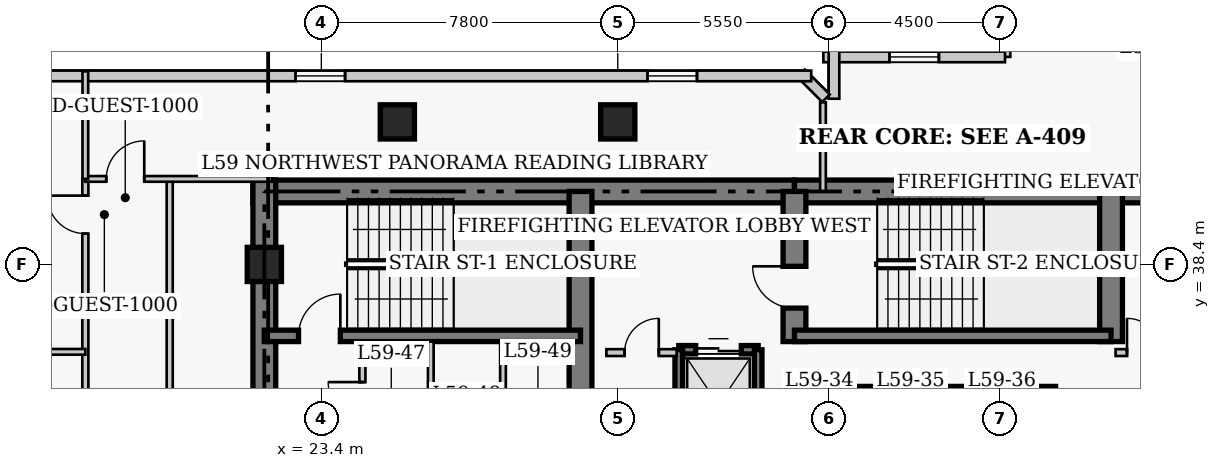
"""IFC4 building model, lengths in metres.
Left out: names, types, materials, properties, quantities, classifications, styles, units other than length and angle.
Written with IfcOpenShell. Run it as: python <this file> out.ifc"""

import sys

from ifc_helpers import new_model, si_unit, direction, frame, frame_2d, origin, origin_2d, place, context, subcontext, project, spatial, rectangle, extrude, element, fill, save


model = new_model("IFC4")
c1 = context("Model", 3, precision=1e-05, world=origin(), true_north=direction((0.0, 1.0)))
c2 = subcontext(c1, "Body", "Model", "MODEL_VIEW")
j1 = project(units=[si_unit("LENGTHUNIT", "METRE"), si_unit("PLANEANGLEUNIT", "RADIAN")], contexts=[c1])
p1 = place(None, origin())
s1 = spatial("IfcSite", under=j1, at=p1, CompositionType="ELEMENT")
p2 = place(p1, origin())
s2 = spatial("IfcBuilding", under=s1, at=p2, CompositionType="ELEMENT")
p3 = place(p2, frame((0.0, 0.0, 236.5)))
s3 = spatial("IfcBuildingStorey", under=s2, at=p3, CompositionType="ELEMENT", Elevation=236.5)
p4 = place(p3, frame((21.6, 40.32, 0.0), z_axis=(0.0, 0.0, 1.0), x_axis=(1.0, 0.0, 0.0)))
e1 = element("IfcWall", 1, at=p4, inside=s3, PredefinedType="SHEAR", context=c2, shape_type="SweptSolid", body=[
    extrude(rectangle(XDim=14.25, YDim=0.6, at=frame_2d((7.125, 0.0))), origin(), (0.0, 0.0, 1.0), 3.9),
])
p5 = place(p3, frame((35.85, 40.32, 0.0), z_axis=(0.0, 0.0, 1.0), x_axis=(1.0, 0.0, 0.0)))
e2 = element("IfcWall", 2, at=p5, inside=s3, PredefinedType="SHEAR", context=c2, shape_type="SweptSolid", body=[
    extrude(rectangle(XDim=12.6, YDim=0.6, at=frame_2d((6.3, 0.0))), origin(), (0.0, 0.0, 1.0), 3.9),
])
p6 = place(p3, frame((21.9, 27.05, 0.0), z_axis=(0.0, 0.0, 1.0), x_axis=(0.0, 1.0, 0.0)))
e3 = element("IfcWall", 3, at=p6, inside=s3, PredefinedType="SHEAR", context=c2, shape_type="SweptSolid", body=[
    extrude(rectangle(XDim=13.57, YDim=0.6, at=frame_2d((6.785, 0.0))), origin(), (0.0, 0.0, 1.0), 3.9),
])
p7 = place(p3, frame((30.22, 33.05, 0.0), z_axis=(0.0, 0.0, 1.0), x_axis=(0.0, 1.0, 0.0)))
e4 = element("IfcWall", 4, at=p7, inside=s3, PredefinedType="SHEAR", context=c2, shape_type="SweptSolid", body=[
    extrude(rectangle(XDim=7.27, YDim=0.6, at=frame_2d((3.635, 0.0))), origin(), (0.0, 0.0, 1.0), 3.9),
])
p8 = place(p3, frame((35.85, 36.37, 0.0), z_axis=(0.0, 0.0, 1.0), x_axis=(0.0, 1.0, 0.0)))
e5 = element("IfcWall", 5, at=p8, inside=s3, PredefinedType="SHEAR", context=c2, shape_type="SweptSolid", body=[
    extrude(rectangle(XDim=3.95, YDim=0.6, at=frame_2d((1.975, 0.0))), origin(), (0.0, 0.0, 1.0), 3.9),
])
p9 = place(p8, frame((0.88, 0.0, 0.0)))
e6 = element("IfcOpeningElement", 6, at=p9, cuts=e5, PredefinedType="OPENING", context=c2, shape_type="SweptSolid", body=[
    extrude(rectangle(XDim=1.1, YDim=2.15, at=frame_2d((0.55, 1.075))), frame((0.0, 0.31, 0.0), z_axis=(0.0, -1.0, 0.0), x_axis=(1.0, 0.0, 0.0)), (0.0, 0.0, 1.0), 0.62),
])
p10 = place(p3, frame((44.18, 36.37, 0.0), z_axis=(0.0, 0.0, 1.0), x_axis=(0.0, 1.0, 0.0)))
e7 = element("IfcWall", 7, at=p10, inside=s3, PredefinedType="SHEAR", context=c2, shape_type="SweptSolid", body=[
    extrude(rectangle(XDim=3.95, YDim=0.6, at=frame_2d((1.975, 0.0))), origin(), (0.0, 0.0, 1.0), 3.9),
])
p11 = place(p3, frame((21.9, 36.52, 0.0), z_axis=(0.0, 0.0, 1.0), x_axis=(1.0, 0.0, 0.0)))
e8 = element("IfcWall", 8, at=p11, inside=s3, PredefinedType="SHEAR", context=c2, shape_type="SweptSolid", body=[
    extrude(rectangle(XDim=8.32, YDim=0.3, at=frame_2d((4.16, 0.0))), origin(), (0.0, 0.0, 1.0), 3.9),
])
p12 = place(p11, frame((0.9, 0.0, 0.0)))
e9 = element("IfcOpeningElement", 9, at=p12, cuts=e8, PredefinedType="OPENING", context=c2, shape_type="SweptSolid", body=[
    extrude(rectangle(XDim=1.1, YDim=2.15, at=frame_2d((0.55, 1.075))), frame((0.0, 0.16, 0.0), z_axis=(0.0, -1.0, 0.0), x_axis=(1.0, 0.0, 0.0)), (0.0, 0.0, 1.0), 0.32),
])
p13 = place(p3, frame((35.85, 36.52, 0.0), z_axis=(0.0, 0.0, 1.0), x_axis=(1.0, 0.0, 0.0)))
e10 = element("IfcWall", 10, at=p13, inside=s3, PredefinedType="SHEAR", context=c2, shape_type="SweptSolid", body=[
    extrude(rectangle(XDim=8.33, YDim=0.3, at=frame_2d((4.165, 0.0))), origin(), (0.0, 0.0, 1.0), 3.9),
])
for number, where, z_axis, x_axis in (
    (11, (21.9, 38.4, 0.0), (0.0, 0.0, 1.0), (1.0, 0.0, 0.0)),
    (12, (25.4, 42.15, 0.0), (0.0, 0.0, 1.0), (1.0, 0.0, 0.0)),
    (13, (31.2, 42.15, 0.0), (0.0, 0.0, 1.0), (1.0, 0.0, 0.0)),
):
    element("IfcColumn", number, at=place(p3, frame(where, z_axis=z_axis, x_axis=x_axis)), inside=s3, PredefinedType="COLUMN", context=c2, shape_type="SweptSolid", body=[
        extrude(rectangle(XDim=0.9, YDim=0.9, at=origin_2d()), origin(), (0.0, 0.0, 1.0), 3.9),
    ])
p14 = place(p3, frame((41.39, 47.44, 0.0), z_axis=(0.0, 0.0, 1.0), x_axis=(0.0, -1.0, 0.0)))
e14 = element("IfcWall", 14, at=p14, inside=s3, PredefinedType="SOLIDWALL", context=c2, shape_type="SweptSolid", body=[
    extrude(rectangle(XDim=3.58, YDim=0.28, at=frame_2d((1.79, 0.0))), origin(), (0.0, 0.0, 1.0), 3.52),
])
p15 = place(p14, frame((1.14, 0.0, 0.85)))
e15 = element("IfcOpeningElement", 15, at=p15, cuts=e14, PredefinedType="OPENING", context=c2, shape_type="SweptSolid", body=[
    extrude(rectangle(XDim=1.3, YDim=1.7, at=frame_2d((0.65, 0.85))), frame((0.0, 0.15, 0.0), z_axis=(0.0, -1.0, 0.0), x_axis=(1.0, 0.0, 0.0)), (0.0, 0.0, 1.0), 0.3),
])
p16 = place(p3, frame((41.39, 43.86, 0.0), z_axis=(0.0, 0.0, 1.0), x_axis=(-1.0, 0.0, 0.0)))
e16 = element("IfcWall", 16, at=p16, inside=s3, PredefinedType="SOLIDWALL", context=c2, shape_type="SweptSolid", body=[
    extrude(rectangle(XDim=4.78, YDim=0.28, at=frame_2d((2.39, 0.0))), origin(), (0.0, 0.0, 1.0), 3.52),
])
p17 = place(p16, frame((1.74, 0.0, 0.85)))
e17 = element("IfcOpeningElement", 17, at=p17, cuts=e16, PredefinedType="OPENING", context=c2, shape_type="SweptSolid", body=[
    extrude(rectangle(XDim=1.3, YDim=1.7, at=frame_2d((0.65, 0.85))), frame((0.0, 0.15, 0.0), z_axis=(0.0, -1.0, 0.0), x_axis=(1.0, 0.0, 0.0)), (0.0, 0.0, 1.0), 0.3),
])
p18 = place(p3, frame((36.89, 44.14, 0.0), z_axis=(0.0, 0.0, 1.0), x_axis=(0.0, -1.0, 0.0)))
e18 = element("IfcWall", 18, at=p18, inside=s3, PredefinedType="SOLIDWALL", context=c2, shape_type="SweptSolid", body=[
    extrude(rectangle(XDim=1.38, YDim=0.28, at=frame_2d((0.69, 0.0))), origin(), (0.0, 0.0, 1.0), 3.52),
])
p19 = place(p3, frame((36.679, 42.773, 0.0), z_axis=(0.0, 0.0, 1.0), x_axis=(-0.707106781187, 0.707106781187, 0.0)))
e19 = element("IfcWall", 19, at=p19, inside=s3, PredefinedType="SOLIDWALL", context=c2, shape_type="SweptSolid", body=[
    extrude(rectangle(XDim=0.928, YDim=0.28, at=frame_2d((0.464, 0.0))), origin(), (0.0, 0.0, 1.0), 3.52),
])
p20 = place(p3, frame((36.29, 43.36, 0.0), z_axis=(0.0, 0.0, 1.0), x_axis=(-1.0, 0.0, 0.0)))
e20 = element("IfcWall", 20, at=p20, inside=s3, PredefinedType="SOLIDWALL", context=c2, shape_type="SweptSolid", body=[
    extrude(rectangle(XDim=25.83, YDim=0.28, at=frame_2d((12.915, 0.0))), origin(), (0.0, 0.0, 1.0), 3.52),
])
p21 = place(p20, frame((3.005, 0.0, 0.85)))
e21 = element("IfcOpeningElement", 21, at=p21, cuts=e20, PredefinedType="OPENING", context=c2, shape_type="SweptSolid", body=[
    extrude(rectangle(XDim=1.3, YDim=1.7, at=frame_2d((0.65, 0.85))), frame((0.0, 0.15, 0.0), z_axis=(0.0, -1.0, 0.0), x_axis=(1.0, 0.0, 0.0)), (0.0, 0.0, 1.0), 0.3),
])
p22 = place(p20, frame((12.265, 0.0, 0.85)))
e22 = element("IfcOpeningElement", 22, at=p22, cuts=e20, PredefinedType="OPENING", context=c2, shape_type="SweptSolid", body=[
    extrude(rectangle(XDim=1.3, YDim=1.7, at=frame_2d((0.65, 0.85))), frame((0.0, 0.15, 0.0), z_axis=(0.0, -1.0, 0.0), x_axis=(1.0, 0.0, 0.0)), (0.0, 0.0, 1.0), 0.3),
])
p23 = place(p20, frame((20.875, 0.0, 0.85)))
e23 = element("IfcOpeningElement", 23, at=p23, cuts=e20, PredefinedType="OPENING", context=c2, shape_type="SweptSolid", body=[
    extrude(rectangle(XDim=1.3, YDim=1.7, at=frame_2d((0.65, 0.85))), frame((0.0, 0.15, 0.0), z_axis=(0.0, -1.0, 0.0), x_axis=(1.0, 0.0, 0.0)), (0.0, 0.0, 1.0), 0.3),
])
p24 = place(p3, frame((35.68, 35.08, 0.0), z_axis=(0.0, 0.0, 1.0), x_axis=(1.0, 0.0, 0.0)))
e24 = element("IfcWall", 24, at=p24, inside=s3, PredefinedType="SHEAR", context=c2, shape_type="SweptSolid", body=[
    extrude(rectangle(XDim=2.32, YDim=0.22, at=frame_2d((1.16, 0.0))), origin(), (0.0, 0.0, 1.0), 3.9),
])
p25 = place(p3, frame((38.0, 35.08, 0.0), z_axis=(0.0, 0.0, 1.0), x_axis=(1.0, 0.0, 0.0)))
e25 = element("IfcWall", 25, at=p25, inside=s3, PredefinedType="SHEAR", context=c2, shape_type="SweptSolid", body=[
    extrude(rectangle(XDim=2.4, YDim=0.22, at=frame_2d((1.2, 0.0))), origin(), (0.0, 0.0, 1.0), 3.9),
])
p26 = place(p3, frame((40.4, 35.08, 0.0), z_axis=(0.0, 0.0, 1.0), x_axis=(1.0, 0.0, 0.0)))
e26 = element("IfcWall", 26, at=p26, inside=s3, PredefinedType="SHEAR", context=c2, shape_type="SweptSolid", body=[
    extrude(rectangle(XDim=2.32, YDim=0.22, at=frame_2d((1.16, 0.0))), origin(), (0.0, 0.0, 1.0), 3.9),
])
p27 = place(p3, frame((32.805, 36.155, 0.0), z_axis=(0.0, 0.0, 1.0), x_axis=(1.0, 0.0, 0.0)))
e27 = element("IfcWall", 27, at=p27, inside=s3, PredefinedType="SHEAR", context=c2, shape_type="SweptSolid", body=[
    extrude(rectangle(XDim=2.09, YDim=0.22, at=frame_2d((1.045, 0.0))), origin(), (0.0, 0.0, 1.0), 3.9),
])
p28 = place(p27, frame((0.445, 0.0, 0.0)))
e28 = element("IfcOpeningElement", 28, at=p28, cuts=e27, PredefinedType="OPENING", context=c2, shape_type="SweptSolid", body=[
    extrude(rectangle(XDim=1.2, YDim=2.15, at=frame_2d((0.6, 1.075))), frame((0.0, 0.12, 0.0), z_axis=(0.0, -1.0, 0.0), x_axis=(1.0, 0.0, 0.0)), (0.0, 0.0, 1.0), 0.24),
])
for number, where, z_axis, x_axis in (
    (29, (32.805, 33.245, 0.0), (0.0, 0.0, 1.0), (0.0, 1.0, 0.0)),
    (30, (34.895, 33.245, 0.0), (0.0, 0.0, 1.0), (0.0, 1.0, 0.0)),
):
    element("IfcWall", number, at=place(p3, frame(where, z_axis=z_axis, x_axis=x_axis)), inside=s3, PredefinedType="SHEAR", context=c2, shape_type="SweptSolid", body=[
        extrude(rectangle(XDim=2.91, YDim=0.2, at=frame_2d((1.455, 0.0))), origin(), (0.0, 0.0, 1.0), 3.9),
    ])
p29 = place(p3, frame((30.9, 36.08, 0.0), z_axis=(0.0, 0.0, 1.0), x_axis=(1.0, 0.0, 0.0)))
e31 = element("IfcWall", 31, at=p29, inside=s3, PredefinedType="PARTITIONING", context=c2, shape_type="SweptSolid", body=[
    extrude(rectangle(XDim=1.85, YDim=0.18, at=frame_2d((0.925, 0.0))), origin(), (0.0, 0.0, 1.0), 3.52),
])
p30 = place(p29, frame((0.48, 0.0, 0.0)))
e32 = element("IfcOpeningElement", 32, at=p30, cuts=e31, PredefinedType="OPENING", context=c2, shape_type="SweptSolid", body=[
    extrude(rectangle(XDim=0.9, YDim=2.15, at=frame_2d((0.45, 1.075))), frame((0.0, 0.1, 0.0), z_axis=(0.0, -1.0, 0.0), x_axis=(1.0, 0.0, 0.0)), (0.0, 0.0, 1.0), 0.2),
])
p31 = place(p3, frame((44.3, 36.08, 0.0), z_axis=(0.0, 0.0, 1.0), x_axis=(1.0, 0.0, 0.0)))
e33 = element("IfcWall", 33, at=p31, inside=s3, PredefinedType="PARTITIONING", context=c2, shape_type="SweptSolid", body=[
    extrude(rectangle(XDim=1.5, YDim=0.18, at=frame_2d((0.75, 0.0))), origin(), (0.0, 0.0, 1.0), 3.52),
])
p32 = place(p31, frame((0.3, 0.0, 0.0)))
e34 = element("IfcOpeningElement", 34, at=p32, cuts=e33, PredefinedType="OPENING", context=c2, shape_type="SweptSolid", body=[
    extrude(rectangle(XDim=0.9, YDim=2.15, at=frame_2d((0.45, 1.075))), frame((0.0, 0.1, 0.0), z_axis=(0.0, -1.0, 0.0), x_axis=(1.0, 0.0, 0.0)), (0.0, 0.0, 1.0), 0.2),
])
p33 = place(p3, frame((24.48, 32.8, 0.0), z_axis=(0.0, 0.0, 1.0), x_axis=(0.0, 1.0, 0.0)))
e35 = element("IfcWall", 35, at=p33, inside=s3, PredefinedType="PARTITIONING", context=c2, shape_type="SweptSolid", body=[
    extrude(rectangle(XDim=3.57, YDim=0.16, at=frame_2d((1.785, 0.0))), origin(), (0.0, 0.0, 1.0), 3.52),
])
p34 = place(p33, frame((1.604, 0.0, 0.0)))
e36 = element("IfcOpeningElement", 36, at=p34, cuts=e35, PredefinedType="OPENING", context=c2, shape_type="SweptSolid", body=[
    extrude(rectangle(XDim=0.9, YDim=2.1, at=frame_2d((0.45, 1.05))), frame((0.0, 0.09, 0.0), z_axis=(0.0, -1.0, 0.0), x_axis=(1.0, 0.0, 0.0)), (0.0, 0.0, 1.0), 0.18),
])
for number, where, z_axis, x_axis in (
    (37, (26.28, 32.75, 0.0), (0.0, 0.0, 1.0), (0.0, 1.0, 0.0)),
    (38, (28.18, 32.75, 0.0), (0.0, 0.0, 1.0), (0.0, 1.0, 0.0)),
):
    element("IfcWall", number, at=place(p3, frame(where, z_axis=z_axis, x_axis=x_axis)), inside=s3, PredefinedType="PARTITIONING", context=c2, shape_type="SweptSolid", body=[
        extrude(rectangle(XDim=3.62, YDim=0.15, at=frame_2d((1.81, 0.0))), origin(), (0.0, 0.0, 1.0), 3.52),
    ])
p35 = place(p3, frame((17.19, 7.55, 0.0), z_axis=(0.0, 0.0, 1.0), x_axis=(0.0, 1.0, 0.0)))
e39 = element("IfcWall", 39, at=p35, inside=s3, PredefinedType="PARTITIONING", context=c2, shape_type="SweptSolid", body=[
    extrude(rectangle(XDim=33.1, YDim=0.16, at=frame_2d((16.55, 0.0))), origin(), (0.0, 0.0, 1.0), 3.52),
])
p36 = place(p35, frame((1.35, 0.0, 0.0)))
e40 = element("IfcOpeningElement", 40, at=p36, cuts=e39, PredefinedType="OPENING", context=c2, shape_type="SweptSolid", body=[
    extrude(rectangle(XDim=0.95, YDim=2.1, at=frame_2d((0.475, 1.05))), frame((0.0, 0.09, 0.0), z_axis=(0.0, -1.0, 0.0), x_axis=(1.0, 0.0, 0.0)), (0.0, 0.0, 1.0), 0.18),
])
p37 = place(p35, frame((7.575, 0.0, 0.0)))
e41 = element("IfcOpeningElement", 41, at=p37, cuts=e39, PredefinedType="OPENING", context=c2, shape_type="SweptSolid", body=[
    extrude(rectangle(XDim=0.95, YDim=2.1, at=frame_2d((0.475, 1.05))), frame((0.0, 0.09, 0.0), z_axis=(0.0, -1.0, 0.0), x_axis=(1.0, 0.0, 0.0)), (0.0, 0.0, 1.0), 0.18),
])
p38 = place(p35, frame((16.375, 0.0, 0.0)))
e42 = element("IfcOpeningElement", 42, at=p38, cuts=e39, PredefinedType="OPENING", context=c2, shape_type="SweptSolid", body=[
    extrude(rectangle(XDim=0.95, YDim=2.1, at=frame_2d((0.475, 1.05))), frame((0.0, 0.09, 0.0), z_axis=(0.0, -1.0, 0.0), x_axis=(1.0, 0.0, 0.0)), (0.0, 0.0, 1.0), 0.18),
])
p39 = place(p35, frame((24.425, 0.0, 0.0)))
e43 = element("IfcOpeningElement", 43, at=p39, cuts=e39, PredefinedType="OPENING", context=c2, shape_type="SweptSolid", body=[
    extrude(rectangle(XDim=0.95, YDim=2.1, at=frame_2d((0.475, 1.05))), frame((0.0, 0.09, 0.0), z_axis=(0.0, -1.0, 0.0), x_axis=(1.0, 0.0, 0.0)), (0.0, 0.0, 1.0), 0.18),
])
p40 = place(p35, frame((31.66, 0.0, 0.0)))
e44 = element("IfcOpeningElement", 44, at=p40, cuts=e39, PredefinedType="OPENING", context=c2, shape_type="SweptSolid", body=[
    extrude(rectangle(XDim=1.0, YDim=2.15, at=frame_2d((0.5, 1.075))), frame((0.0, 0.09, 0.0), z_axis=(0.0, -1.0, 0.0), x_axis=(1.0, 0.0, 0.0)), (0.0, 0.0, 1.0), 0.18),
])
p41 = place(p3, frame((19.41, 35.02, 0.0), z_axis=(0.0, 0.0, 1.0), x_axis=(0.0, 1.0, 0.0)))
e45 = element("IfcWall", 45, at=p41, inside=s3, PredefinedType="PARTITIONING", context=c2, shape_type="SweptSolid", body=[
    extrude(rectangle(XDim=5.63, YDim=0.16, at=frame_2d((2.815, 0.0))), origin(), (0.0, 0.0, 1.0), 3.52),
])
p42 = place(p3, frame((17.19, 40.65, 0.0), z_axis=(0.0, 0.0, 1.0), x_axis=(1.0, 0.0, 0.0)))
e46 = element("IfcWall", 46, at=p42, inside=s3, PredefinedType="PARTITIONING", context=c2, shape_type="SweptSolid", body=[
    extrude(rectangle(XDim=4.91, YDim=0.15, at=frame_2d((2.455, 0.0))), origin(), (0.0, 0.0, 1.0), 3.52),
])
p43 = place(p42, frame((0.55, 0.0, 0.0)))
e47 = element("IfcOpeningElement", 47, at=p43, cuts=e46, PredefinedType="OPENING", context=c2, shape_type="SweptSolid", body=[
    extrude(rectangle(XDim=1.0, YDim=2.15, at=frame_2d((0.5, 1.075))), frame((0.0, 0.085, 0.0), z_axis=(0.0, -1.0, 0.0), x_axis=(1.0, 0.0, 0.0)), (0.0, 0.0, 1.0), 0.17),
])
p44 = place(p3, frame((17.19, 40.65, 0.0), z_axis=(0.0, 0.0, 1.0), x_axis=(0.0, 1.0, 0.0)))
e48 = element("IfcWall", 48, at=p44, inside=s3, PredefinedType="PARTITIONING", context=c2, shape_type="SweptSolid", body=[
    extrude(rectangle(XDim=2.83, YDim=0.15, at=frame_2d((1.415, 0.0))), origin(), (0.0, 0.0, 1.0), 3.52),
])
p45 = place(p3, frame((36.6, 40.32, 0.0), z_axis=(0.0, 0.0, 1.0), x_axis=(0.0, 1.0, 0.0)))
e49 = element("IfcWall", 49, at=p45, inside=s3, PredefinedType="PARTITIONING", context=c2, shape_type="SweptSolid", body=[
    extrude(rectangle(XDim=2.345, YDim=0.15, at=frame_2d((1.172, 0.0))), origin(), (0.0, 0.0, 1.0), 3.52),
])
p46 = place(p3, frame((14.45, 36.1, 0.0), z_axis=(0.0, 0.0, 1.0), x_axis=(1.0, 0.0, 0.0)))
e50 = element("IfcWall", 50, at=p46, inside=s3, PredefinedType="PARTITIONING", context=c2, shape_type="SweptSolid", body=[
    extrude(rectangle(XDim=2.74, YDim=0.15, at=frame_2d((1.37, 0.0))), origin(), (0.0, 0.0, 1.0), 3.52),
])
p47 = place(p17, origin())
e51 = element("IfcWindow", 51, at=p47, inside=s3, PartitioningType="SINGLE_PANEL", PredefinedType="WINDOW", context=c2, shape_type="SweptSolid", body=[
    extrude(rectangle(XDim=1.3, YDim=1.7, at=frame_2d((0.65, 0.85))), frame((0.0, 0.03, 0.0), z_axis=(0.0, -1.0, 0.0), x_axis=(1.0, 0.0, 0.0)), (0.0, 0.0, 1.0), 0.06),
])
fill(e17, e51)
p48 = place(p21, origin())
e52 = element("IfcWindow", 52, at=p48, inside=s3, PartitioningType="SINGLE_PANEL", PredefinedType="WINDOW", context=c2, shape_type="SweptSolid", body=[
    extrude(rectangle(XDim=1.3, YDim=1.7, at=frame_2d((0.65, 0.85))), frame((0.0, 0.03, 0.0), z_axis=(0.0, -1.0, 0.0), x_axis=(1.0, 0.0, 0.0)), (0.0, 0.0, 1.0), 0.06),
])
fill(e21, e52)
p49 = place(p22, origin())
e53 = element("IfcWindow", 53, at=p49, inside=s3, PartitioningType="SINGLE_PANEL", PredefinedType="WINDOW", context=c2, shape_type="SweptSolid", body=[
    extrude(rectangle(XDim=1.3, YDim=1.7, at=frame_2d((0.65, 0.85))), frame((0.0, 0.03, 0.0), z_axis=(0.0, -1.0, 0.0), x_axis=(1.0, 0.0, 0.0)), (0.0, 0.0, 1.0), 0.06),
])
fill(e22, e53)
p50 = place(p28, origin())
e54 = element("IfcDoor", 54, at=p50, inside=s3, OperationType="DOUBLE_DOOR_SLIDING", PredefinedType="DOOR", context=c2, shape_type="SweptSolid", body=[
    extrude(rectangle(XDim=1.2, YDim=2.15, at=frame_2d((0.6, 1.075))), frame((0.0, 0.025, 0.0), z_axis=(0.0, -1.0, 0.0), x_axis=(1.0, 0.0, 0.0)), (0.0, 0.0, 1.0), 0.05),
])
fill(e28, e54)
p51 = place(p30, origin())
e55 = element("IfcDoor", 55, at=p51, inside=s3, OperationType="SINGLE_SWING_RIGHT", PredefinedType="DOOR", context=c2, shape_type="SweptSolid", body=[
    extrude(rectangle(XDim=0.9, YDim=2.15, at=frame_2d((0.45, 1.075))), frame((0.0, 0.025, 0.0), z_axis=(0.0, -1.0, 0.0), x_axis=(1.0, 0.0, 0.0)), (0.0, 0.0, 1.0), 0.05),
])
fill(e32, e55)
p52 = place(p32, origin())
e56 = element("IfcDoor", 56, at=p52, inside=s3, OperationType="SINGLE_SWING_LEFT", PredefinedType="DOOR", context=c2, shape_type="SweptSolid", body=[
    extrude(rectangle(XDim=0.9, YDim=2.15, at=frame_2d((0.45, 1.075))), frame((0.0, 0.025, 0.0), z_axis=(0.0, -1.0, 0.0), x_axis=(1.0, 0.0, 0.0)), (0.0, 0.0, 1.0), 0.05),
])
fill(e34, e56)
p53 = place(p34, origin())
e57 = element("IfcDoor", 57, at=p53, inside=s3, OperationType="SINGLE_SWING_RIGHT", PredefinedType="DOOR", context=c2, shape_type="SweptSolid", body=[
    extrude(rectangle(XDim=0.9, YDim=2.1, at=frame_2d((0.45, 1.05))), frame((0.0, 0.025, 0.0), z_axis=(0.0, -1.0, 0.0), x_axis=(1.0, 0.0, 0.0)), (0.0, 0.0, 1.0), 0.05),
])
fill(e36, e57)
p54 = place(p43, origin())
e58 = element("IfcDoor", 58, at=p54, inside=s3, OperationType="SINGLE_SWING_RIGHT", PredefinedType="DOOR", context=c2, shape_type="SweptSolid", body=[
    extrude(rectangle(XDim=1.0, YDim=2.15, at=frame_2d((0.5, 1.075))), frame((0.0, 0.025, 0.0), z_axis=(0.0, -1.0, 0.0), x_axis=(1.0, 0.0, 0.0)), (0.0, 0.0, 1.0), 0.05),
])
fill(e47, e58)
p55 = place(p40, origin())
e59 = element("IfcDoor", 59, at=p55, inside=s3, OperationType="SINGLE_SWING_RIGHT", PredefinedType="DOOR", context=c2, shape_type="SweptSolid", body=[
    extrude(rectangle(XDim=1.0, YDim=2.15, at=frame_2d((0.5, 1.075))), frame((0.0, 0.025, 0.0), z_axis=(0.0, -1.0, 0.0), x_axis=(1.0, 0.0, 0.0)), (0.0, 0.0, 1.0), 0.05),
])
fill(e44, e59)
p56 = place(p12, origin())
e60 = element("IfcDoor", 60, at=p56, inside=s3, OperationType="SINGLE_SWING_RIGHT", PredefinedType="DOOR", context=c2, shape_type="SweptSolid", body=[
    extrude(rectangle(XDim=1.1, YDim=2.15, at=frame_2d((0.55, 1.075))), frame((0.0, 0.025, 0.0), z_axis=(0.0, -1.0, 0.0), x_axis=(1.0, 0.0, 0.0)), (0.0, 0.0, 1.0), 0.05),
])
fill(e9, e60)
p57 = place(p9, origin())
e61 = element("IfcDoor", 61, at=p57, inside=s3, OperationType="SINGLE_SWING_RIGHT", PredefinedType="DOOR", context=c2, shape_type="SweptSolid", body=[
    extrude(rectangle(XDim=1.1, YDim=2.15, at=frame_2d((0.55, 1.075))), frame((0.0, 0.025, 0.0), z_axis=(0.0, -1.0, 0.0), x_axis=(1.0, 0.0, 0.0)), (0.0, 0.0, 1.0), 0.05),
])
fill(e6, e61)
save(model, sys.argv[1])
